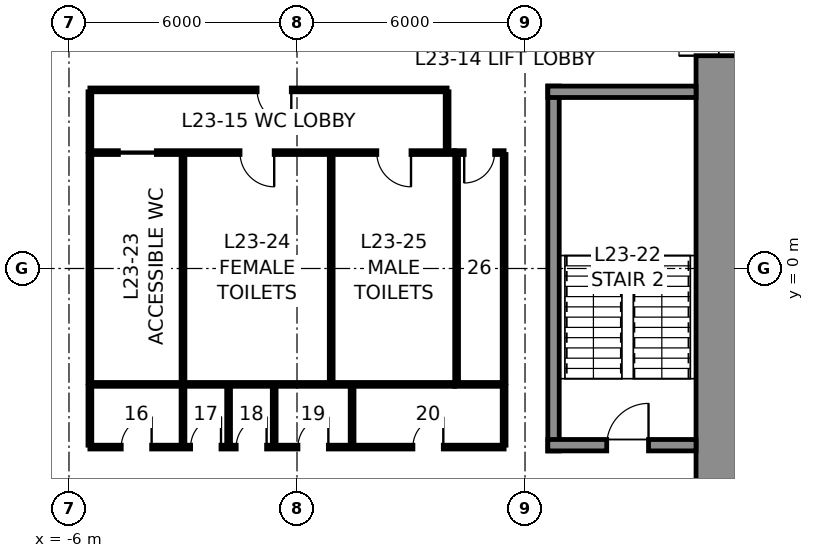
"""IFC4 building model, lengths in metres.
Left out: names, types, materials, properties, quantities, classifications, styles, units other than length and angle.
Written with IfcOpenShell. Run it as: python <this file> out.ifc"""

import sys

from ifc_helpers import new_model, si_unit, direction, frame, frame_2d, origin, place, context, subcontext, project, spatial, rectangle, extrude, element, fill, save


model = new_model("IFC4")
c1 = context("Model", 3, precision=1e-05, world=origin(), true_north=direction((0.0, 1.0)))
c2 = subcontext(c1, "Body", "Model", "MODEL_VIEW")
j1 = project(units=[si_unit("LENGTHUNIT", "METRE"), si_unit("PLANEANGLEUNIT", "RADIAN")], contexts=[c1])
p1 = place(None, origin())
s1 = spatial("IfcSite", under=j1, at=p1, CompositionType="ELEMENT")
p2 = place(p1, origin())
s2 = spatial("IfcBuilding", under=s1, at=p2, CompositionType="ELEMENT")
p3 = place(p2, frame((0.0, 0.0, 118.2)))
s3 = spatial("IfcBuildingStorey", under=s2, at=p3, CompositionType="ELEMENT", Elevation=118.2)
p4 = place(p3, frame((11.25, 10.5, 0.0), z_axis=(0.0, 0.0, 1.0), x_axis=(0.0, -1.0, 0.0)))
e1 = element("IfcWall", 1, at=p4, inside=s3, PredefinedType="SHEAR", context=c2, shape_type="SweptSolid", body=[
    extrude(rectangle(XDim=21.0, YDim=1.5, at=frame_2d((10.5, 0.0))), origin(), (0.0, 0.0, 1.0), 4.6),
])
p5 = place(p4, frame((3.7, 0.0, 0.0)))
e2 = element("IfcOpeningElement", 2, at=p5, cuts=e1, PredefinedType="OPENING", context=c2, shape_type="SweptSolid", body=[
    extrude(rectangle(XDim=1.2, YDim=2.3, at=frame_2d((0.6, 1.15))), frame((0.0, 0.76, 0.0), z_axis=(0.0, -1.0, 0.0), x_axis=(1.0, 0.0, 0.0)), (0.0, 0.0, 1.0), 1.52),
])
p6 = place(p4, frame((16.1, 0.0, 0.0)))
e3 = element("IfcOpeningElement", 3, at=p6, cuts=e1, PredefinedType="OPENING", context=c2, shape_type="SweptSolid", body=[
    extrude(rectangle(XDim=1.2, YDim=2.3, at=frame_2d((0.6, 1.15))), frame((0.0, 0.76, 0.0), z_axis=(0.0, -1.0, 0.0), x_axis=(1.0, 0.0, 0.0)), (0.0, 0.0, 1.0), 1.52),
])
p7 = place(p3, frame((6.75, -4.8, 0.0), z_axis=(0.0, 0.0, 1.0), x_axis=(0.0, 1.0, 0.0)))
e4 = element("IfcWall", 4, at=p7, inside=s3, PredefinedType="SOLIDWALL", context=c2, shape_type="SweptSolid", body=[
    extrude(rectangle(XDim=9.6, YDim=0.3, at=frame_2d((4.8, 0.0))), origin(), (0.0, 0.0, 1.0), 4.35),
])
p8 = place(p3, frame((6.6, 4.65, 0.0), z_axis=(0.0, 0.0, 1.0), x_axis=(1.0, 0.0, 0.0)))
e5 = element("IfcWall", 5, at=p8, inside=s3, PredefinedType="SOLIDWALL", context=c2, shape_type="SweptSolid", body=[
    extrude(rectangle(XDim=3.9, YDim=0.3, at=frame_2d((1.95, 0.0))), origin(), (0.0, 0.0, 1.0), 4.35),
])
p9 = place(p3, frame((10.5, -4.65, 0.0), z_axis=(0.0, 0.0, 1.0), x_axis=(-1.0, 0.0, 0.0)))
e6 = element("IfcWall", 6, at=p9, inside=s3, PredefinedType="SOLIDWALL", context=c2, shape_type="SweptSolid", body=[
    extrude(rectangle(XDim=3.9, YDim=0.3, at=frame_2d((1.95, 0.0))), origin(), (0.0, 0.0, 1.0), 4.35),
])
p10 = place(p9, frame((1.25, 0.0, 0.0)))
e7 = element("IfcOpeningElement", 7, at=p10, cuts=e6, PredefinedType="OPENING", context=c2, shape_type="SweptSolid", body=[
    extrude(rectangle(XDim=1.1, YDim=2.3, at=frame_2d((0.55, 1.15))), frame((0.0, 0.16, 0.0), z_axis=(0.0, -1.0, 0.0), x_axis=(1.0, 0.0, 0.0)), (0.0, 0.0, 1.0), 0.32),
])
p11 = place(p3, frame((-5.45, 3.05, 0.0), z_axis=(0.0, 0.0, 1.0), x_axis=(1.0, 0.0, 0.0)))
e8 = element("IfcWall", 8, at=p11, inside=s3, PredefinedType="PARTITIONING", context=c2, shape_type="SweptSolid", body=[
    extrude(rectangle(XDim=9.6, YDim=0.1, at=frame_2d((4.8, 0.0))), origin(), (0.0, 0.0, 1.0), 4.35),
])
p12 = place(p11, frame((0.75, 0.0, 0.0)))
e9 = element("IfcOpeningElement", 9, at=p12, cuts=e8, PredefinedType="OPENING", context=c2, shape_type="SweptSolid", body=[
    extrude(rectangle(XDim=1.0, YDim=2.3, at=frame_2d((0.5, 1.15))), frame((0.0, 0.06, 0.0), z_axis=(0.0, -1.0, 0.0), x_axis=(1.0, 0.0, 0.0)), (0.0, 0.0, 1.0), 0.12),
])
p13 = place(p11, frame((3.95, 0.0, 0.0)))
e10 = element("IfcOpeningElement", 10, at=p13, cuts=e8, PredefinedType="OPENING", context=c2, shape_type="SweptSolid", body=[
    extrude(rectangle(XDim=0.9, YDim=2.3, at=frame_2d((0.45, 1.15))), frame((0.0, 0.06, 0.0), z_axis=(0.0, -1.0, 0.0), x_axis=(1.0, 0.0, 0.0)), (0.0, 0.0, 1.0), 0.12),
])
p14 = place(p11, frame((7.55, 0.0, 0.0)))
e11 = element("IfcOpeningElement", 11, at=p14, cuts=e8, PredefinedType="OPENING", context=c2, shape_type="SweptSolid", body=[
    extrude(rectangle(XDim=0.9, YDim=2.3, at=frame_2d((0.45, 1.15))), frame((0.0, 0.06, 0.0), z_axis=(0.0, -1.0, 0.0), x_axis=(1.0, 0.0, 0.0)), (0.0, 0.0, 1.0), 0.12),
])
p15 = place(p3, frame((4.15, 3.05, 0.0), z_axis=(0.0, 0.0, 1.0), x_axis=(1.0, 0.0, 0.0)))
e12 = element("IfcWall", 12, at=p15, inside=s3, PredefinedType="PARTITIONING", context=c2, shape_type="SweptSolid", body=[
    extrude(rectangle(XDim=1.3, YDim=0.1, at=frame_2d((0.65, 0.0))), origin(), (0.0, 0.0, 1.0), 4.35),
])
p16 = place(p15, frame((0.25, 0.0, 0.0)))
e13 = element("IfcOpeningElement", 13, at=p16, cuts=e12, PredefinedType="OPENING", context=c2, shape_type="SweptSolid", body=[
    extrude(rectangle(XDim=0.8, YDim=2.3, at=frame_2d((0.4, 1.15))), frame((0.0, 0.06, 0.0), z_axis=(0.0, -1.0, 0.0), x_axis=(1.0, 0.0, 0.0)), (0.0, 0.0, 1.0), 0.12),
])
p17 = place(p3, frame((4.15, -3.05, 0.0), z_axis=(0.0, 0.0, 1.0), x_axis=(-1.0, 0.0, 0.0)))
e14 = element("IfcWall", 14, at=p17, inside=s3, PredefinedType="PARTITIONING", context=c2, shape_type="SweptSolid", body=[
    extrude(rectangle(XDim=9.6, YDim=0.1, at=frame_2d((4.8, 0.0))), origin(), (0.0, 0.0, 1.0), 4.35),
])
p18 = place(p3, frame((5.45, -3.05, 0.0), z_axis=(0.0, 0.0, 1.0), x_axis=(-1.0, 0.0, 0.0)))
e15 = element("IfcWall", 15, at=p18, inside=s3, PredefinedType="PARTITIONING", context=c2, shape_type="SweptSolid", body=[
    extrude(rectangle(XDim=1.3, YDim=0.1, at=frame_2d((0.65, 0.0))), origin(), (0.0, 0.0, 1.0), 4.35),
])
for number, where, z_axis, x_axis in (
    (16, (5.45, 3.0, 0.0), (0.0, 0.0, 1.0), (0.0, -1.0, 0.0)),
    (17, (-5.45, -3.0, 0.0), (0.0, 0.0, 1.0), (0.0, 1.0, 0.0)),
    (18, (-3.0, -3.0, 0.0), (0.0, 0.0, 1.0), (0.0, 1.0, 0.0)),
    (19, (0.9, -3.0, 0.0), (0.0, 0.0, 1.0), (0.0, 1.0, 0.0)),
    (20, (4.2, -3.0, 0.0), (0.0, 0.0, 1.0), (0.0, 1.0, 0.0)),
):
    element("IfcWall", number, at=place(p3, frame(where, z_axis=z_axis, x_axis=x_axis)), inside=s3, PredefinedType="PARTITIONING", context=c2, shape_type="SweptSolid", body=[
        extrude(rectangle(XDim=6.0, YDim=0.1, at=frame_2d((3.0, 0.0))), origin(), (0.0, 0.0, 1.0), 4.35),
    ])
p19 = place(p3, frame((-5.45, 4.7, 0.0), z_axis=(0.0, 0.0, 1.0), x_axis=(1.0, 0.0, 0.0)))
e21 = element("IfcWall", 21, at=p19, inside=s3, PredefinedType="PARTITIONING", context=c2, shape_type="SweptSolid", body=[
    extrude(rectangle(XDim=9.4, YDim=0.1, at=frame_2d((4.7, 0.0))), origin(), (0.0, 0.0, 1.0), 4.35),
])
p20 = place(p19, frame((4.4, 0.0, 0.0)))
e22 = element("IfcOpeningElement", 22, at=p20, cuts=e21, PredefinedType="OPENING", context=c2, shape_type="SweptSolid", body=[
    extrude(rectangle(XDim=0.9, YDim=2.3, at=frame_2d((0.45, 1.15))), frame((0.0, 0.06, 0.0), z_axis=(0.0, -1.0, 0.0), x_axis=(1.0, 0.0, 0.0)), (0.0, 0.0, 1.0), 0.12),
])
for number, where, z_axis, x_axis in (
    (23, (-5.45, 3.1, 0.0), (0.0, 0.0, 1.0), (0.0, 1.0, 0.0)),
    (24, (3.95, 3.1, 0.0), (0.0, 0.0, 1.0), (0.0, 1.0, 0.0)),
):
    element("IfcWall", number, at=place(p3, frame(where, z_axis=z_axis, x_axis=x_axis)), inside=s3, PredefinedType="PARTITIONING", context=c2, shape_type="SweptSolid", body=[
        extrude(rectangle(XDim=1.55, YDim=0.1, at=frame_2d((0.775, 0.0))), origin(), (0.0, 0.0, 1.0), 4.35),
    ])
p21 = place(p3, frame((5.45, -4.7, 0.0), z_axis=(0.0, 0.0, 1.0), x_axis=(-1.0, 0.0, 0.0)))
e25 = element("IfcWall", 25, at=p21, inside=s3, PredefinedType="PARTITIONING", context=c2, shape_type="SweptSolid", body=[
    extrude(rectangle(XDim=10.9, YDim=0.1, at=frame_2d((5.45, 0.0))), origin(), (0.0, 0.0, 1.0), 4.35),
])
p22 = place(p21, frame((9.275, 0.0, 0.0)))
e26 = element("IfcOpeningElement", 26, at=p22, cuts=e25, PredefinedType="OPENING", context=c2, shape_type="SweptSolid", body=[
    extrude(rectangle(XDim=0.8, YDim=2.3, at=frame_2d((0.4, 1.15))), frame((0.0, 0.06, 0.0), z_axis=(0.0, -1.0, 0.0), x_axis=(1.0, 0.0, 0.0)), (0.0, 0.0, 1.0), 0.12),
])
p23 = place(p21, frame((7.45, 0.0, 0.0)))
e27 = element("IfcOpeningElement", 27, at=p23, cuts=e25, PredefinedType="OPENING", context=c2, shape_type="SweptSolid", body=[
    extrude(rectangle(XDim=0.8, YDim=2.3, at=frame_2d((0.4, 1.15))), frame((0.0, 0.06, 0.0), z_axis=(0.0, -1.0, 0.0), x_axis=(1.0, 0.0, 0.0)), (0.0, 0.0, 1.0), 0.12),
])
p24 = place(p21, frame((6.25, 0.0, 0.0)))
e28 = element("IfcOpeningElement", 28, at=p24, cuts=e25, PredefinedType="OPENING", context=c2, shape_type="SweptSolid", body=[
    extrude(rectangle(XDim=0.8, YDim=2.3, at=frame_2d((0.4, 1.15))), frame((0.0, 0.06, 0.0), z_axis=(0.0, -1.0, 0.0), x_axis=(1.0, 0.0, 0.0)), (0.0, 0.0, 1.0), 0.12),
])
p25 = place(p21, frame((4.625, 0.0, 0.0)))
e29 = element("IfcOpeningElement", 29, at=p25, cuts=e25, PredefinedType="OPENING", context=c2, shape_type="SweptSolid", body=[
    extrude(rectangle(XDim=0.8, YDim=2.3, at=frame_2d((0.4, 1.15))), frame((0.0, 0.06, 0.0), z_axis=(0.0, -1.0, 0.0), x_axis=(1.0, 0.0, 0.0)), (0.0, 0.0, 1.0), 0.12),
])
p26 = place(p21, frame((1.6, 0.0, 0.0)))
e30 = element("IfcOpeningElement", 30, at=p26, cuts=e25, PredefinedType="OPENING", context=c2, shape_type="SweptSolid", body=[
    extrude(rectangle(XDim=0.8, YDim=2.3, at=frame_2d((0.4, 1.15))), frame((0.0, 0.06, 0.0), z_axis=(0.0, -1.0, 0.0), x_axis=(1.0, 0.0, 0.0)), (0.0, 0.0, 1.0), 0.12),
])
for number, where, z_axis, x_axis in (
    (31, (-5.45, -3.1, 0.0), (0.0, 0.0, 1.0), (0.0, -1.0, 0.0)),
    (32, (5.45, -3.1, 0.0), (0.0, 0.0, 1.0), (0.0, -1.0, 0.0)),
    (33, (-3.0, -3.1, 0.0), (0.0, 0.0, 1.0), (0.0, -1.0, 0.0)),
    (34, (-1.8, -3.1, 0.0), (0.0, 0.0, 1.0), (0.0, -1.0, 0.0)),
    (35, (-0.6, -3.1, 0.0), (0.0, 0.0, 1.0), (0.0, -1.0, 0.0)),
    (36, (1.45, -3.1, 0.0), (0.0, 0.0, 1.0), (0.0, -1.0, 0.0)),
):
    element("IfcWall", number, at=place(p3, frame(where, z_axis=z_axis, x_axis=x_axis)), inside=s3, PredefinedType="PARTITIONING", context=c2, shape_type="SweptSolid", body=[
        extrude(rectangle(XDim=1.55, YDim=0.1, at=frame_2d((0.775, 0.0))), origin(), (0.0, 0.0, 1.0), 4.35),
    ])
p27 = place(p10, frame((1.1, 0.0, 0.0), z_axis=(0.0, 0.0, 1.0), x_axis=(-1.0, 0.0, 0.0)))
e37 = element("IfcDoor", 37, at=p27, inside=s3, OperationType="SINGLE_SWING_RIGHT", PredefinedType="DOOR", context=c2, shape_type="SweptSolid", body=[
    extrude(rectangle(XDim=1.1, YDim=2.3, at=frame_2d((0.55, 1.15))), frame((0.0, 0.025, 0.0), z_axis=(0.0, -1.0, 0.0), x_axis=(1.0, 0.0, 0.0)), (0.0, 0.0, 1.0), 0.05),
])
fill(e7, e37)
p28 = place(p12, frame((1.0, 0.0, 0.0), z_axis=(0.0, 0.0, 1.0), x_axis=(-1.0, 0.0, 0.0)))
e38 = element("IfcDoor", 38, at=p28, inside=s3, OperationType="SLIDING_TO_LEFT", PredefinedType="DOOR", context=c2, shape_type="SweptSolid", body=[
    extrude(rectangle(XDim=1.0, YDim=2.3, at=frame_2d((0.5, 1.15))), frame((0.0, 0.025, 0.0), z_axis=(0.0, -1.0, 0.0), x_axis=(1.0, 0.0, 0.0)), (0.0, 0.0, 1.0), 0.05),
])
fill(e9, e38)
p29 = place(p13, frame((0.9, 0.0, 0.0), z_axis=(0.0, 0.0, 1.0), x_axis=(-1.0, 0.0, 0.0)))
e39 = element("IfcDoor", 39, at=p29, inside=s3, OperationType="SINGLE_SWING_LEFT", PredefinedType="DOOR", context=c2, shape_type="SweptSolid", body=[
    extrude(rectangle(XDim=0.9, YDim=2.3, at=frame_2d((0.45, 1.15))), frame((0.0, 0.025, 0.0), z_axis=(0.0, -1.0, 0.0), x_axis=(1.0, 0.0, 0.0)), (0.0, 0.0, 1.0), 0.05),
])
fill(e10, e39)
p30 = place(p14, frame((0.9, 0.0, 0.0), z_axis=(0.0, 0.0, 1.0), x_axis=(-1.0, 0.0, 0.0)))
e40 = element("IfcDoor", 40, at=p30, inside=s3, OperationType="SINGLE_SWING_LEFT", PredefinedType="DOOR", context=c2, shape_type="SweptSolid", body=[
    extrude(rectangle(XDim=0.9, YDim=2.3, at=frame_2d((0.45, 1.15))), frame((0.0, 0.025, 0.0), z_axis=(0.0, -1.0, 0.0), x_axis=(1.0, 0.0, 0.0)), (0.0, 0.0, 1.0), 0.05),
])
fill(e11, e40)
p31 = place(p16, frame((0.8, 0.0, 0.0), z_axis=(0.0, 0.0, 1.0), x_axis=(-1.0, 0.0, 0.0)))
e41 = element("IfcDoor", 41, at=p31, inside=s3, OperationType="SINGLE_SWING_RIGHT", PredefinedType="DOOR", context=c2, shape_type="SweptSolid", body=[
    extrude(rectangle(XDim=0.8, YDim=2.3, at=frame_2d((0.4, 1.15))), frame((0.0, 0.025, 0.0), z_axis=(0.0, -1.0, 0.0), x_axis=(1.0, 0.0, 0.0)), (0.0, 0.0, 1.0), 0.05),
])
fill(e13, e41)
p32 = place(p20, frame((0.9, 0.0, 0.0), z_axis=(0.0, 0.0, 1.0), x_axis=(-1.0, 0.0, 0.0)))
e42 = element("IfcDoor", 42, at=p32, inside=s3, OperationType="SINGLE_SWING_LEFT", PredefinedType="DOOR", context=c2, shape_type="SweptSolid", body=[
    extrude(rectangle(XDim=0.9, YDim=2.3, at=frame_2d((0.45, 1.15))), frame((0.0, 0.025, 0.0), z_axis=(0.0, -1.0, 0.0), x_axis=(1.0, 0.0, 0.0)), (0.0, 0.0, 1.0), 0.05),
])
fill(e22, e42)
p33 = place(p22, frame((0.8, 0.0, 0.0), z_axis=(0.0, 0.0, 1.0), x_axis=(-1.0, 0.0, 0.0)))
e43 = element("IfcDoor", 43, at=p33, inside=s3, OperationType="SINGLE_SWING_RIGHT", PredefinedType="DOOR", context=c2, shape_type="SweptSolid", body=[
    extrude(rectangle(XDim=0.8, YDim=2.3, at=frame_2d((0.4, 1.15))), frame((0.0, 0.025, 0.0), z_axis=(0.0, -1.0, 0.0), x_axis=(1.0, 0.0, 0.0)), (0.0, 0.0, 1.0), 0.05),
])
fill(e26, e43)
p34 = place(p23, frame((0.8, 0.0, 0.0), z_axis=(0.0, 0.0, 1.0), x_axis=(-1.0, 0.0, 0.0)))
e44 = element("IfcDoor", 44, at=p34, inside=s3, OperationType="SINGLE_SWING_RIGHT", PredefinedType="DOOR", context=c2, shape_type="SweptSolid", body=[
    extrude(rectangle(XDim=0.8, YDim=2.3, at=frame_2d((0.4, 1.15))), frame((0.0, 0.025, 0.0), z_axis=(0.0, -1.0, 0.0), x_axis=(1.0, 0.0, 0.0)), (0.0, 0.0, 1.0), 0.05),
])
fill(e27, e44)
p35 = place(p24, frame((0.8, 0.0, 0.0), z_axis=(0.0, 0.0, 1.0), x_axis=(-1.0, 0.0, 0.0)))
e45 = element("IfcDoor", 45, at=p35, inside=s3, OperationType="SINGLE_SWING_RIGHT", PredefinedType="DOOR", context=c2, shape_type="SweptSolid", body=[
    extrude(rectangle(XDim=0.8, YDim=2.3, at=frame_2d((0.4, 1.15))), frame((0.0, 0.025, 0.0), z_axis=(0.0, -1.0, 0.0), x_axis=(1.0, 0.0, 0.0)), (0.0, 0.0, 1.0), 0.05),
])
fill(e28, e45)
p36 = place(p25, frame((0.8, 0.0, 0.0), z_axis=(0.0, 0.0, 1.0), x_axis=(-1.0, 0.0, 0.0)))
e46 = element("IfcDoor", 46, at=p36, inside=s3, OperationType="SINGLE_SWING_RIGHT", PredefinedType="DOOR", context=c2, shape_type="SweptSolid", body=[
    extrude(rectangle(XDim=0.8, YDim=2.3, at=frame_2d((0.4, 1.15))), frame((0.0, 0.025, 0.0), z_axis=(0.0, -1.0, 0.0), x_axis=(1.0, 0.0, 0.0)), (0.0, 0.0, 1.0), 0.05),
])
fill(e29, e46)
p37 = place(p26, frame((0.8, 0.0, 0.0), z_axis=(0.0, 0.0, 1.0), x_axis=(-1.0, 0.0, 0.0)))
e47 = element("IfcDoor", 47, at=p37, inside=s3, OperationType="SINGLE_SWING_RIGHT", PredefinedType="DOOR", context=c2, shape_type="SweptSolid", body=[
    extrude(rectangle(XDim=0.8, YDim=2.3, at=frame_2d((0.4, 1.15))), frame((0.0, 0.025, 0.0), z_axis=(0.0, -1.0, 0.0), x_axis=(1.0, 0.0, 0.0)), (0.0, 0.0, 1.0), 0.05),
])
fill(e30, e47)
p38 = place(p5, frame((1.2, 0.0, 0.0), z_axis=(0.0, 0.0, 1.0), x_axis=(-1.0, 0.0, 0.0)))
e48 = element("IfcDoor", 48, at=p38, inside=s3, OperationType="SINGLE_SWING_LEFT", PredefinedType="DOOR", context=c2, shape_type="SweptSolid", body=[
    extrude(rectangle(XDim=1.2, YDim=2.3, at=frame_2d((0.6, 1.15))), frame((0.0, 0.025, 0.0), z_axis=(0.0, -1.0, 0.0), x_axis=(1.0, 0.0, 0.0)), (0.0, 0.0, 1.0), 0.05),
])
fill(e2, e48)
save(model, sys.argv[1])
